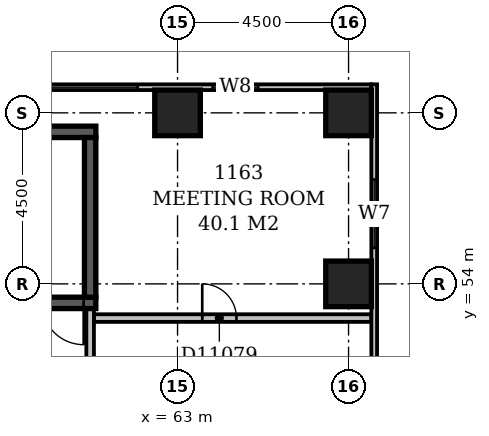
"""IFC4 building model, lengths in metres.
Left out: names, types, materials, properties, quantities, classifications, styles, units other than length and angle.
Written with IfcOpenShell. Run it as: python <this file> out.ifc"""

import sys

from ifc_helpers import new_model, si_unit, direction, frame, frame_2d, origin, origin_2d, place, context, subcontext, project, spatial, rectangle, extrude, element, fill, save


model = new_model("IFC4")
c1 = context("Model", 3, precision=1e-05, world=origin(), true_north=direction((0.0, 1.0)))
c2 = subcontext(c1, "Body", "Model", "MODEL_VIEW")
j1 = project(units=[si_unit("LENGTHUNIT", "METRE"), si_unit("PLANEANGLEUNIT", "RADIAN")], contexts=[c1])
p1 = place(None, origin())
s1 = spatial("IfcSite", under=j1, at=p1, CompositionType="ELEMENT")
p2 = place(p1, origin())
s2 = spatial("IfcBuilding", under=s1, at=p2, CompositionType="ELEMENT")
p3 = place(p2, frame((0.0, 0.0, 50.6)))
s3 = spatial("IfcBuildingStorey", under=s2, at=p3, CompositionType="ELEMENT", Elevation=50.6)
p4 = place(p3, frame((53.85, 53.5, -0.3), z_axis=(0.0, 0.0, 1.0), x_axis=(1.0, 0.0, 0.0)))
e1 = element("IfcWall", 1, at=p4, inside=s3, PredefinedType="SHEAR", context=c2, shape_type="SweptSolid", body=[
    extrude(rectangle(XDim=7.0, YDim=0.3, at=frame_2d((3.5, 0.0))), origin(), (0.0, 0.0, 1.0), 3.6),
])
p5 = place(p4, frame((5.58, 0.0, 0.3)))
e2 = element("IfcOpeningElement", 2, at=p5, cuts=e1, PredefinedType="OPENING", context=c2, shape_type="SweptSolid", body=[
    extrude(rectangle(XDim=1.1, YDim=2.1, at=frame_2d((0.55, 1.05))), frame((0.0, 0.162, 0.0), z_axis=(0.0, -1.0, 0.0), x_axis=(1.0, 0.0, 0.0)), (0.0, 0.0, 1.0), 0.324),
])
p6 = place(p3, frame((53.85, 58.0, -0.3), z_axis=(0.0, 0.0, 1.0), x_axis=(1.0, 0.0, 0.0)))
e3 = element("IfcWall", 3, at=p6, inside=s3, PredefinedType="SHEAR", context=c2, shape_type="SweptSolid", body=[
    extrude(rectangle(XDim=7.0, YDim=0.3, at=frame_2d((3.5, 0.0))), origin(), (0.0, 0.0, 1.0), 3.6),
])
p7 = place(p3, frame((60.7, 53.65, -0.3), z_axis=(0.0, 0.0, 1.0), x_axis=(0.0, 1.0, 0.0)))
e4 = element("IfcWall", 4, at=p7, inside=s3, PredefinedType="SHEAR", context=c2, shape_type="SweptSolid", body=[
    extrude(rectangle(XDim=4.2, YDim=0.3, at=frame_2d((2.1, 0.0))), origin(), (0.0, 0.0, 1.0), 3.6),
])
for number, where, z_axis, x_axis in (
    (5, (67.5, 54.0, -0.3), (0.0, 0.0, 1.0), (1.0, 0.0, 0.0)),
    (6, (63.0, 58.5, -0.3), (0.0, 0.0, 1.0), (1.0, 0.0, 0.0)),
    (7, (67.5, 58.5, -0.3), (0.0, 0.0, 1.0), (1.0, 0.0, 0.0)),
):
    element("IfcColumn", number, at=place(p3, frame(where, z_axis=z_axis, x_axis=x_axis)), inside=s3, PredefinedType="COLUMN", context=c2, shape_type="SweptSolid", body=[
        extrude(rectangle(XDim=1.2, YDim=1.2, at=origin_2d()), origin(), (0.0, 0.0, 1.0), 3.6),
    ])
p8 = place(p3, frame((68.175, 35.4, 0.0), z_axis=(0.0, 0.0, 1.0), x_axis=(0.0, 1.0, 0.0)))
e8 = element("IfcWall", 8, at=p8, inside=s3, PredefinedType="STANDARD", context=c2, shape_type="SweptSolid", body=[
    extrude(rectangle(XDim=23.85, YDim=0.15, at=frame_2d((11.925, 0.0))), origin(), (0.0, 0.0, 1.0), 2.7),
])
p9 = place(p8, frame((2.977, 0.0, 0.6)))
e9 = element("IfcOpeningElement", 9, at=p9, cuts=e8, PredefinedType="OPENING", context=c2, shape_type="SweptSolid", body=[
    extrude(rectangle(XDim=1.2, YDim=1.8, at=frame_2d((0.6, 0.9))), frame((0.0, 0.087, 0.0), z_axis=(0.0, -1.0, 0.0), x_axis=(1.0, 0.0, 0.0)), (0.0, 0.0, 1.0), 0.174),
])
p10 = place(p8, frame((10.65, 0.0, 0.6)))
e10 = element("IfcOpeningElement", 10, at=p10, cuts=e8, PredefinedType="OPENING", context=c2, shape_type="SweptSolid", body=[
    extrude(rectangle(XDim=2.4, YDim=1.8, at=frame_2d((1.2, 0.9))), frame((0.0, 0.087, 0.0), z_axis=(0.0, -1.0, 0.0), x_axis=(1.0, 0.0, 0.0)), (0.0, 0.0, 1.0), 0.174),
])
p11 = place(p8, frame((19.545, 0.0, 0.6)))
e11 = element("IfcOpeningElement", 11, at=p11, cuts=e8, PredefinedType="OPENING", context=c2, shape_type="SweptSolid", body=[
    extrude(rectangle(XDim=1.8, YDim=1.8, at=frame_2d((0.9, 0.9))), frame((0.0, 0.087, 0.0), z_axis=(0.0, -1.0, 0.0), x_axis=(1.0, 0.0, 0.0)), (0.0, 0.0, 1.0), 0.174),
])
p12 = place(p3, frame((68.1, 59.175, 0.0), z_axis=(0.0, 0.0, 1.0), x_axis=(-1.0, 0.0, 0.0)))
e12 = element("IfcWall", 12, at=p12, inside=s3, PredefinedType="STANDARD", context=c2, shape_type="SweptSolid", body=[
    extrude(rectangle(XDim=68.85, YDim=0.15, at=frame_2d((34.425, 0.0))), origin(), (0.0, 0.0, 1.0), 2.7),
])
p13 = place(p12, frame((2.977, 0.0, 0.6)))
e13 = element("IfcOpeningElement", 13, at=p13, cuts=e12, PredefinedType="OPENING", context=c2, shape_type="SweptSolid", body=[
    extrude(rectangle(XDim=1.2, YDim=1.8, at=frame_2d((0.6, 0.9))), frame((0.0, 0.087, 0.0), z_axis=(0.0, -1.0, 0.0), x_axis=(1.0, 0.0, 0.0)), (0.0, 0.0, 1.0), 0.174),
])
p14 = place(p12, frame((6.15, 0.0, 0.6)))
e14 = element("IfcOpeningElement", 14, at=p14, cuts=e12, PredefinedType="OPENING", context=c2, shape_type="SweptSolid", body=[
    extrude(rectangle(XDim=2.4, YDim=1.8, at=frame_2d((1.2, 0.9))), frame((0.0, 0.087, 0.0), z_axis=(0.0, -1.0, 0.0), x_axis=(1.0, 0.0, 0.0)), (0.0, 0.0, 1.0), 0.174),
])
p15 = place(p12, frame((37.65, 0.0, 0.6)))
e15 = element("IfcOpeningElement", 15, at=p15, cuts=e12, PredefinedType="OPENING", context=c2, shape_type="SweptSolid", body=[
    extrude(rectangle(XDim=2.4, YDim=1.8, at=frame_2d((1.2, 0.9))), frame((0.0, 0.087, 0.0), z_axis=(0.0, -1.0, 0.0), x_axis=(1.0, 0.0, 0.0)), (0.0, 0.0, 1.0), 0.174),
])
p16 = place(p3, frame((60.7, 51.6, 0.0), z_axis=(0.0, 0.0, 1.0), x_axis=(0.0, 1.0, 0.0)))
e16 = element("IfcWall", 16, at=p16, inside=s3, PredefinedType="PARTITIONING", context=c2, shape_type="SweptSolid", body=[
    extrude(rectangle(XDim=1.73, YDim=0.2, at=frame_2d((0.865, 0.0))), origin(), (0.0, 0.0, 1.0), 3.3),
])
p17 = place(p3, frame((60.8, 53.1, 0.0), z_axis=(0.0, 0.0, 1.0), x_axis=(1.0, 0.0, 0.0)))
e17 = element("IfcWall", 17, at=p17, inside=s3, PredefinedType="PARTITIONING", context=c2, shape_type="SweptSolid", body=[
    extrude(rectangle(XDim=7.3, YDim=0.2, at=frame_2d((3.65, 0.0))), origin(), (0.0, 0.0, 1.0), 3.3),
])
p18 = place(p17, frame((2.85, 0.0, 0.0)))
e18 = element("IfcOpeningElement", 18, at=p18, cuts=e17, PredefinedType="OPENING", context=c2, shape_type="SweptSolid", body=[
    extrude(rectangle(XDim=0.9, YDim=2.1, at=frame_2d((0.45, 1.05))), frame((0.0, 0.112, 0.0), z_axis=(0.0, -1.0, 0.0), x_axis=(1.0, 0.0, 0.0)), (0.0, 0.0, 1.0), 0.224),
])
p19 = place(p11, origin())
e19 = element("IfcWindow", 19, at=p19, inside=s3, PartitioningType="SINGLE_PANEL", PredefinedType="WINDOW", context=c2, shape_type="SweptSolid", body=[
    extrude(rectangle(XDim=1.8, YDim=1.8, at=frame_2d((0.9, 0.9))), frame((0.0, 0.03, 0.0), z_axis=(0.0, -1.0, 0.0), x_axis=(1.0, 0.0, 0.0)), (0.0, 0.0, 1.0), 0.06),
])
fill(e11, e19)
p20 = place(p13, origin())
e20 = element("IfcWindow", 20, at=p20, inside=s3, PartitioningType="SINGLE_PANEL", PredefinedType="WINDOW", context=c2, shape_type="SweptSolid", body=[
    extrude(rectangle(XDim=1.2, YDim=1.8, at=frame_2d((0.6, 0.9))), frame((0.0, 0.03, 0.0), z_axis=(0.0, -1.0, 0.0), x_axis=(1.0, 0.0, 0.0)), (0.0, 0.0, 1.0), 0.06),
])
fill(e13, e20)
p21 = place(p14, origin())
e21 = element("IfcWindow", 21, at=p21, inside=s3, PartitioningType="SINGLE_PANEL", PredefinedType="WINDOW", context=c2, shape_type="SweptSolid", body=[
    extrude(rectangle(XDim=2.4, YDim=1.8, at=frame_2d((1.2, 0.9))), frame((0.0, 0.03, 0.0), z_axis=(0.0, -1.0, 0.0), x_axis=(1.0, 0.0, 0.0)), (0.0, 0.0, 1.0), 0.06),
])
fill(e14, e21)
p22 = place(p5, origin())
e22 = element("IfcDoor", 22, at=p22, inside=s3, OperationType="SINGLE_SWING_RIGHT", PredefinedType="DOOR", context=c2, shape_type="SweptSolid", body=[
    extrude(rectangle(XDim=1.1, YDim=2.1, at=frame_2d((0.55, 1.05))), frame((0.0, 0.025, 0.0), z_axis=(0.0, -1.0, 0.0), x_axis=(1.0, 0.0, 0.0)), (0.0, 0.0, 1.0), 0.05),
])
fill(e2, e22)
p23 = place(p18, origin())
e23 = element("IfcDoor", 23, at=p23, inside=s3, OperationType="SINGLE_SWING_LEFT", PredefinedType="DOOR", context=c2, shape_type="SweptSolid", body=[
    extrude(rectangle(XDim=0.9, YDim=2.1, at=frame_2d((0.45, 1.05))), frame((0.0, 0.025, 0.0), z_axis=(0.0, -1.0, 0.0), x_axis=(1.0, 0.0, 0.0)), (0.0, 0.0, 1.0), 0.05),
])
fill(e18, e23)
save(model, sys.argv[1])
